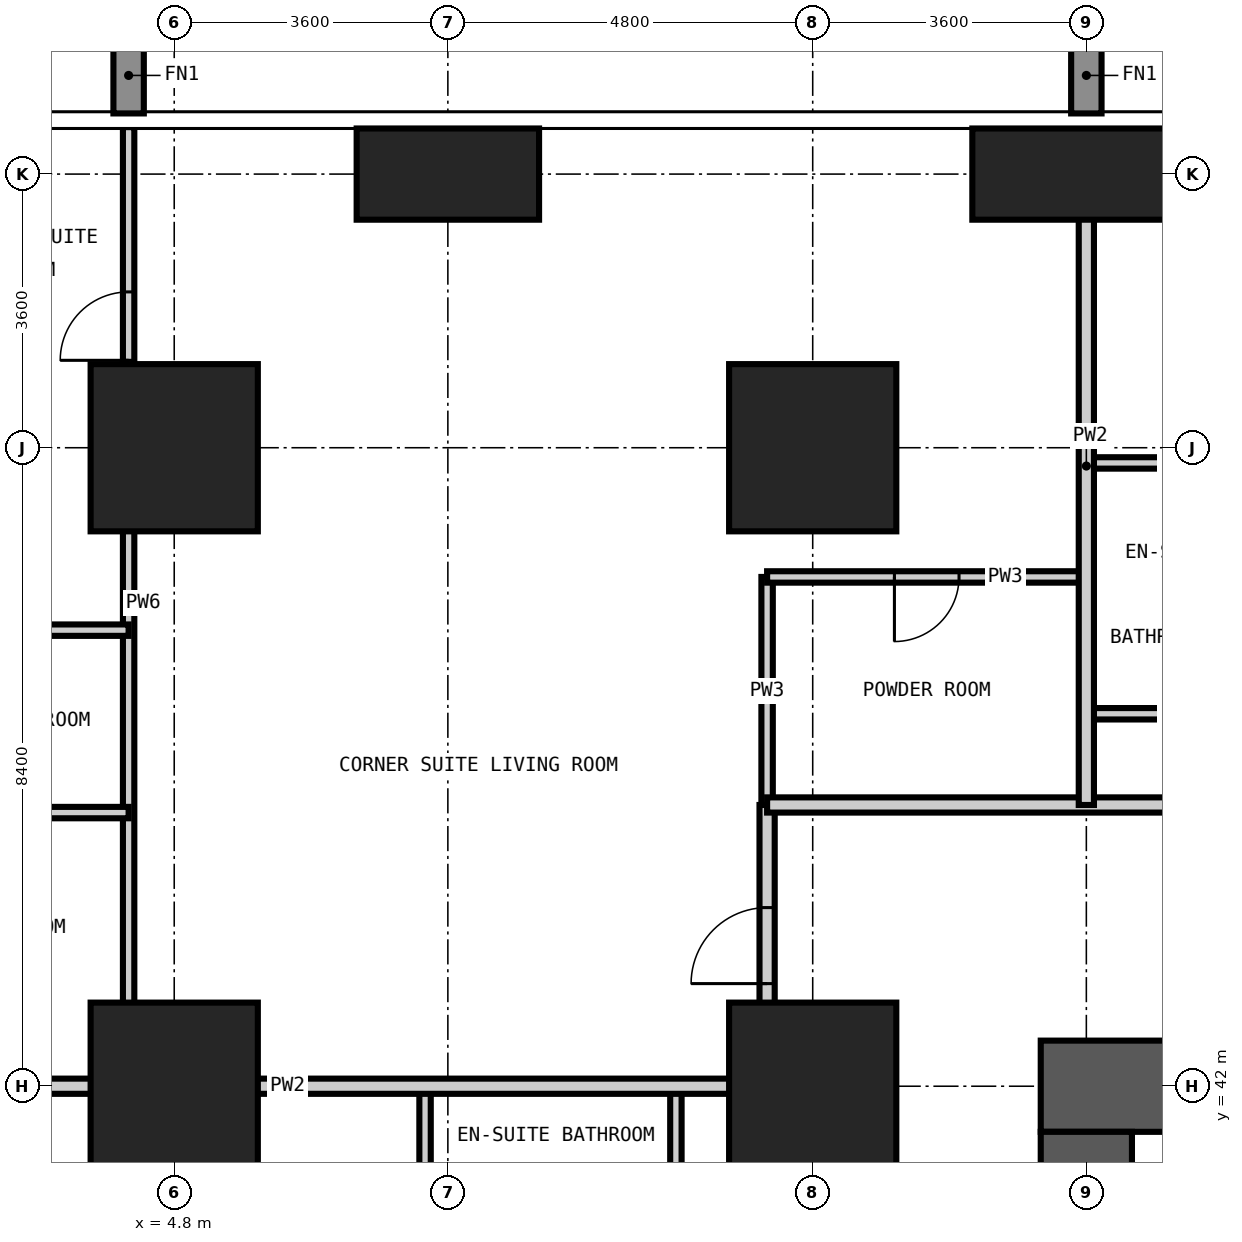
"""IFC4 building model, lengths in metres.
Left out: names, types, materials, properties, quantities, classifications, styles, units other than length and angle.
Written with IfcOpenShell. Run it as: python <this file> out.ifc"""

import sys

from ifc_helpers import new_model, si_unit, direction, frame, frame_2d, origin, origin_2d, place, context, subcontext, project, spatial, rectangle, extrude, element, fill, save


model = new_model("IFC4")
c1 = context("Model", 3, precision=1e-05, world=origin(), true_north=direction((0.0, 1.0)))
c2 = subcontext(c1, "Body", "Model", "MODEL_VIEW")
j1 = project(units=[si_unit("LENGTHUNIT", "METRE"), si_unit("PLANEANGLEUNIT", "RADIAN")], contexts=[c1])
p1 = place(None, origin())
s1 = spatial("IfcSite", under=j1, at=p1, CompositionType="ELEMENT")
p2 = place(p1, origin())
s2 = spatial("IfcBuilding", under=s1, at=p2, CompositionType="ELEMENT")
p3 = place(p2, frame((0.0, 0.0, 97.2)))
s3 = spatial("IfcBuildingStorey", under=s2, at=p3, CompositionType="ELEMENT", Elevation=97.2)
for number, where, z_axis, x_axis in (
    (1, (4.8, 42.0, -0.35), (0.0, 0.0, 1.0), (1.0, 0.0, 0.0)),
    (2, (4.8, 50.4, -0.35), (0.0, 0.0, 1.0), (1.0, 0.0, 0.0)),
):
    element("IfcColumn", number, at=place(p3, frame(where, z_axis=z_axis, x_axis=x_axis)), inside=s3, PredefinedType="COLUMN", context=c2, shape_type="SweptSolid", body=[
        extrude(rectangle(XDim=2.2, YDim=2.2, at=origin_2d()), origin(), (0.0, 0.0, 1.0), 3.6),
    ])
p4 = place(p3, frame((8.4, 54.0, -0.35), z_axis=(0.0, 0.0, 1.0), x_axis=(1.0, 0.0, 0.0)))
e3 = element("IfcColumn", 3, at=p4, inside=s3, PredefinedType="COLUMN", context=c2, shape_type="SweptSolid", body=[
    extrude(rectangle(XDim=2.4, YDim=1.2, at=origin_2d()), origin(), (0.0, 0.0, 1.0), 3.6),
])
for number, where, z_axis, x_axis in (
    (4, (13.2, 42.0, -0.35), (0.0, 0.0, 1.0), (1.0, 0.0, 0.0)),
    (5, (13.2, 50.4, -0.35), (0.0, 0.0, 1.0), (1.0, 0.0, 0.0)),
):
    element("IfcColumn", number, at=place(p3, frame(where, z_axis=z_axis, x_axis=x_axis)), inside=s3, PredefinedType="COLUMN", context=c2, shape_type="SweptSolid", body=[
        extrude(rectangle(XDim=2.2, YDim=2.2, at=origin_2d()), origin(), (0.0, 0.0, 1.0), 3.6),
    ])
p5 = place(p3, frame((16.8, 54.0, -0.35), z_axis=(0.0, 0.0, 1.0), x_axis=(1.0, 0.0, 0.0)))
e6 = element("IfcColumn", 6, at=p5, inside=s3, PredefinedType="COLUMN", context=c2, shape_type="SweptSolid", body=[
    extrude(rectangle(XDim=3.0, YDim=1.2, at=origin_2d()), origin(), (0.0, 0.0, 1.0), 3.6),
])
p6 = place(p3, frame((42.6, 42.0, -0.35), z_axis=(0.0, 0.0, 1.0), x_axis=(-1.0, 0.0, 0.0)))
e7 = element("IfcWall", 7, at=p6, inside=s3, PredefinedType="SHEAR", context=c2, shape_type="SweptSolid", body=[
    extrude(rectangle(XDim=26.4, YDim=1.2, at=frame_2d((13.2, 0.0))), origin(), (0.0, 0.0, 1.0), 3.6),
])
p7 = place(p6, frame((21.1, 0.0, 0.35)))
e8 = element("IfcOpeningElement", 8, at=p7, cuts=e7, PredefinedType="OPENING", context=c2, shape_type="SweptSolid", body=[
    extrude(rectangle(XDim=1.0, YDim=2.1, at=frame_2d((0.5, 1.05))), frame((0.0, 0.61, 0.0), z_axis=(0.0, -1.0, 0.0), x_axis=(1.0, 0.0, 0.0)), (0.0, 0.0, 1.0), 1.22),
])
p8 = place(p6, frame((10.5, 0.0, 0.35)))
e9 = element("IfcOpeningElement", 9, at=p8, cuts=e7, PredefinedType="OPENING", context=c2, shape_type="SweptSolid", body=[
    extrude(rectangle(XDim=1.2, YDim=2.2, at=frame_2d((0.6, 1.1))), frame((0.0, 0.61, 0.0), z_axis=(0.0, -1.0, 0.0), x_axis=(1.0, 0.0, 0.0)), (0.0, 0.0, 1.0), 1.22),
])
p9 = place(p3, frame((16.8, 41.4, -0.35), z_axis=(0.0, 0.0, 1.0), x_axis=(0.0, -1.0, 0.0)))
e10 = element("IfcWall", 10, at=p9, inside=s3, PredefinedType="SHEAR", context=c2, shape_type="SweptSolid", body=[
    extrude(rectangle(XDim=24.0, YDim=1.2, at=frame_2d((12.0, 0.0))), origin(), (0.0, 0.0, 1.0), 3.6),
])
p10 = place(p9, frame((11.1, 0.0, 0.35)))
e11 = element("IfcOpeningElement", 11, at=p10, cuts=e10, PredefinedType="OPENING", context=c2, shape_type="SweptSolid", body=[
    extrude(rectangle(XDim=1.8, YDim=2.2, at=frame_2d((0.9, 1.1))), frame((0.0, 0.61, 0.0), z_axis=(0.0, -1.0, 0.0), x_axis=(1.0, 0.0, 0.0)), (0.0, 0.0, 1.0), 1.22),
])
p11 = place(p9, frame((19.9, 0.0, 0.35)))
e12 = element("IfcOpeningElement", 12, at=p11, cuts=e10, PredefinedType="OPENING", context=c2, shape_type="SweptSolid", body=[
    extrude(rectangle(XDim=1.0, YDim=2.1, at=frame_2d((0.5, 1.05))), frame((0.0, 0.61, 0.0), z_axis=(0.0, -1.0, 0.0), x_axis=(1.0, 0.0, 0.0)), (0.0, 0.0, 1.0), 1.22),
])
p12 = place(p9, frame((5.2, 0.0, 0.35)))
e13 = element("IfcOpeningElement", 13, at=p12, cuts=e10, PredefinedType="OPENING", context=c2, shape_type="SweptSolid", body=[
    extrude(rectangle(XDim=1.0, YDim=2.1, at=frame_2d((0.5, 1.05))), frame((0.0, 0.61, 0.0), z_axis=(0.0, -1.0, 0.0), x_axis=(1.0, 0.0, 0.0)), (0.0, 0.0, 1.0), 1.22),
])
for number, where, z_axis, x_axis in (
    (14, (8.1, 39.6, 0.0), (0.0, 0.0, 1.0), (0.0, 1.0, 0.0)),
    (15, (11.4, 39.6, 0.0), (0.0, 0.0, 1.0), (0.0, 1.0, 0.0)),
):
    element("IfcWall", number, at=place(p3, frame(where, z_axis=z_axis, x_axis=x_axis)), inside=s3, PredefinedType="PARTITIONING", context=c2, shape_type="SweptSolid", body=[
        extrude(rectangle(XDim=2.4, YDim=0.15, at=frame_2d((1.2, 0.0))), origin(), (0.0, 0.0, 1.0), 3.25),
    ])
p13 = place(p3, frame((12.6, 45.7, 0.0), z_axis=(0.0, 0.0, 1.0), x_axis=(0.0, 1.0, 0.0)))
e16 = element("IfcWall", 16, at=p13, inside=s3, PredefinedType="PARTITIONING", context=c2, shape_type="SweptSolid", body=[
    extrude(rectangle(XDim=3.0, YDim=0.15, at=frame_2d((1.5, 0.0))), origin(), (0.0, 0.0, 1.0), 3.25),
])
p14 = place(p3, frame((16.8, 46.9, 0.0), z_axis=(0.0, 0.0, 1.0), x_axis=(1.0, 0.0, 0.0)))
e17 = element("IfcWall", 17, at=p14, inside=s3, PredefinedType="PARTITIONING", context=c2, shape_type="SweptSolid", body=[
    extrude(rectangle(XDim=2.4, YDim=0.15, at=frame_2d((1.2, 0.0))), origin(), (0.0, 0.0, 1.0), 3.25),
])
p15 = place(p3, frame((12.6, 48.7, 0.0), z_axis=(0.0, 0.0, 1.0), x_axis=(1.0, 0.0, 0.0)))
e18 = element("IfcWall", 18, at=p15, inside=s3, PredefinedType="PARTITIONING", context=c2, shape_type="SweptSolid", body=[
    extrude(rectangle(XDim=4.2, YDim=0.15, at=frame_2d((2.1, 0.0))), origin(), (0.0, 0.0, 1.0), 3.25),
])
p16 = place(p15, frame((1.675, 0.0, 0.0)))
e19 = element("IfcOpeningElement", 19, at=p16, cuts=e18, PredefinedType="OPENING", context=c2, shape_type="SweptSolid", body=[
    extrude(rectangle(XDim=0.85, YDim=2.1, at=frame_2d((0.425, 1.05))), frame((0.0, 0.085, 0.0), z_axis=(0.0, -1.0, 0.0), x_axis=(1.0, 0.0, 0.0)), (0.0, 0.0, 1.0), 0.17),
])
p17 = place(p3, frame((16.8, 50.2, 0.0), z_axis=(0.0, 0.0, 1.0), x_axis=(1.0, 0.0, 0.0)))
e20 = element("IfcWall", 20, at=p17, inside=s3, PredefinedType="PARTITIONING", context=c2, shape_type="SweptSolid", body=[
    extrude(rectangle(XDim=2.4, YDim=0.15, at=frame_2d((1.2, 0.0))), origin(), (0.0, 0.0, 1.0), 3.25),
])
p18 = place(p3, frame((12.6, 13.7, 0.0), z_axis=(0.0, 0.0, 1.0), x_axis=(0.0, 1.0, 0.0)))
e21 = element("IfcWall", 21, at=p18, inside=s3, PredefinedType="PARTITIONING", context=c2, shape_type="SweptSolid", body=[
    extrude(rectangle(XDim=32.0, YDim=0.2, at=frame_2d((16.0, 0.0))), origin(), (0.0, 0.0, 1.0), 3.25),
])
p19 = place(p18, frame((5.6, 0.0, 0.0)))
e22 = element("IfcOpeningElement", 22, at=p19, cuts=e21, PredefinedType="OPENING", context=c2, shape_type="SweptSolid", body=[
    extrude(rectangle(XDim=1.0, YDim=2.2, at=frame_2d((0.5, 1.1))), frame((0.0, 0.11, 0.0), z_axis=(0.0, -1.0, 0.0), x_axis=(1.0, 0.0, 0.0)), (0.0, 0.0, 1.0), 0.22),
])
p20 = place(p18, frame((16.4, 0.0, 0.0)))
e23 = element("IfcOpeningElement", 23, at=p20, cuts=e21, PredefinedType="OPENING", context=c2, shape_type="SweptSolid", body=[
    extrude(rectangle(XDim=1.0, YDim=2.2, at=frame_2d((0.5, 1.1))), frame((0.0, 0.11, 0.0), z_axis=(0.0, -1.0, 0.0), x_axis=(1.0, 0.0, 0.0)), (0.0, 0.0, 1.0), 0.22),
])
p21 = place(p18, frame((22.4, 0.0, 0.0)))
e24 = element("IfcOpeningElement", 24, at=p21, cuts=e21, PredefinedType="OPENING", context=c2, shape_type="SweptSolid", body=[
    extrude(rectangle(XDim=1.0, YDim=2.2, at=frame_2d((0.5, 1.1))), frame((0.0, 0.11, 0.0), z_axis=(0.0, -1.0, 0.0), x_axis=(1.0, 0.0, 0.0)), (0.0, 0.0, 1.0), 0.22),
])
p22 = place(p18, frame((0.95, 0.0, 0.0)))
e25 = element("IfcOpeningElement", 25, at=p22, cuts=e21, PredefinedType="OPENING", context=c2, shape_type="SweptSolid", body=[
    extrude(rectangle(XDim=1.0, YDim=2.2, at=frame_2d((0.5, 1.1))), frame((0.0, 0.11, 0.0), z_axis=(0.0, -1.0, 0.0), x_axis=(1.0, 0.0, 0.0)), (0.0, 0.0, 1.0), 0.22),
])
p23 = place(p18, frame((29.65, 0.0, 0.0)))
e26 = element("IfcOpeningElement", 26, at=p23, cuts=e21, PredefinedType="OPENING", context=c2, shape_type="SweptSolid", body=[
    extrude(rectangle(XDim=1.0, YDim=2.2, at=frame_2d((0.5, 1.1))), frame((0.0, 0.11, 0.0), z_axis=(0.0, -1.0, 0.0), x_axis=(1.0, 0.0, 0.0)), (0.0, 0.0, 1.0), 0.22),
])
p24 = place(p3, frame((12.6, 45.7, 0.0), z_axis=(0.0, 0.0, 1.0), x_axis=(1.0, 0.0, 0.0)))
e27 = element("IfcWall", 27, at=p24, inside=s3, PredefinedType="PARTITIONING", context=c2, shape_type="SweptSolid", body=[
    extrude(rectangle(XDim=31.9, YDim=0.2, at=frame_2d((15.95, 0.0))), origin(), (0.0, 0.0, 1.0), 3.25),
])
p25 = place(p24, frame((5.8, 0.0, 0.0)))
e28 = element("IfcOpeningElement", 28, at=p25, cuts=e27, PredefinedType="OPENING", context=c2, shape_type="SweptSolid", body=[
    extrude(rectangle(XDim=1.0, YDim=2.2, at=frame_2d((0.5, 1.1))), frame((0.0, 0.11, 0.0), z_axis=(0.0, -1.0, 0.0), x_axis=(1.0, 0.0, 0.0)), (0.0, 0.0, 1.0), 0.22),
])
p26 = place(p24, frame((12.1, 0.0, 0.0)))
e29 = element("IfcOpeningElement", 29, at=p26, cuts=e27, PredefinedType="OPENING", context=c2, shape_type="SweptSolid", body=[
    extrude(rectangle(XDim=1.0, YDim=2.2, at=frame_2d((0.5, 1.1))), frame((0.0, 0.11, 0.0), z_axis=(0.0, -1.0, 0.0), x_axis=(1.0, 0.0, 0.0)), (0.0, 0.0, 1.0), 0.22),
])
p27 = place(p24, frame((20.5, 0.0, 0.0)))
e30 = element("IfcOpeningElement", 30, at=p27, cuts=e27, PredefinedType="OPENING", context=c2, shape_type="SweptSolid", body=[
    extrude(rectangle(XDim=1.0, YDim=2.2, at=frame_2d((0.5, 1.1))), frame((0.0, 0.11, 0.0), z_axis=(0.0, -1.0, 0.0), x_axis=(1.0, 0.0, 0.0)), (0.0, 0.0, 1.0), 0.22),
])
p28 = place(p24, frame((26.8, 0.0, 0.0)))
e31 = element("IfcOpeningElement", 31, at=p28, cuts=e27, PredefinedType="OPENING", context=c2, shape_type="SweptSolid", body=[
    extrude(rectangle(XDim=1.0, YDim=2.2, at=frame_2d((0.5, 1.1))), frame((0.0, 0.11, 0.0), z_axis=(0.0, -1.0, 0.0), x_axis=(1.0, 0.0, 0.0)), (0.0, 0.0, 1.0), 0.22),
])
p29 = place(p3, frame((16.8, 45.7, 0.0), z_axis=(0.0, 0.0, 1.0), x_axis=(0.0, 1.0, 0.0)))
e32 = element("IfcWall", 32, at=p29, inside=s3, PredefinedType="PARTITIONING", context=c2, shape_type="SweptSolid", body=[
    extrude(rectangle(XDim=8.918, YDim=0.2, at=frame_2d((4.459, 0.0))), origin(), (0.0, 0.0, 1.0), 3.25),
])
p30 = place(p3, frame((-0.018, 42.0, 0.0), z_axis=(0.0, 0.0, 1.0), x_axis=(1.0, 0.0, 0.0)))
e33 = element("IfcWall", 33, at=p30, inside=s3, PredefinedType="PARTITIONING", context=c2, shape_type="SweptSolid", body=[
    extrude(rectangle(XDim=12.618, YDim=0.2, at=frame_2d((6.309, 0.0))), origin(), (0.0, 0.0, 1.0), 3.25),
])
p31 = place(p3, frame((4.2, 42.0, 0.0), z_axis=(0.0, 0.0, 1.0), x_axis=(0.0, 1.0, 0.0)))
e34 = element("IfcWall", 34, at=p31, inside=s3, PredefinedType="PARTITIONING", context=c2, shape_type="SweptSolid", body=[
    extrude(rectangle(XDim=12.618, YDim=0.15, at=frame_2d((6.309, 0.0))), origin(), (0.0, 0.0, 1.0), 3.25),
])
p32 = place(p31, frame((9.55, 0.0, 0.0)))
e35 = element("IfcOpeningElement", 35, at=p32, cuts=e34, PredefinedType="OPENING", context=c2, shape_type="SweptSolid", body=[
    extrude(rectangle(XDim=0.9, YDim=2.1, at=frame_2d((0.45, 1.05))), frame((0.0, 0.085, 0.0), z_axis=(0.0, -1.0, 0.0), x_axis=(1.0, 0.0, 0.0)), (0.0, 0.0, 1.0), 0.17),
])
p33 = place(p3, frame((1.2, 45.6, 0.0), z_axis=(0.0, 0.0, 1.0), x_axis=(1.0, 0.0, 0.0)))
e36 = element("IfcWall", 36, at=p33, inside=s3, PredefinedType="PARTITIONING", context=c2, shape_type="SweptSolid", body=[
    extrude(rectangle(XDim=3.0, YDim=0.15, at=frame_2d((1.5, 0.0))), origin(), (0.0, 0.0, 1.0), 3.25),
])
p34 = place(p3, frame((1.2, 48.0, 0.0), z_axis=(0.0, 0.0, 1.0), x_axis=(1.0, 0.0, 0.0)))
e37 = element("IfcWall", 37, at=p34, inside=s3, PredefinedType="PARTITIONING", context=c2, shape_type="SweptSolid", body=[
    extrude(rectangle(XDim=3.0, YDim=0.15, at=frame_2d((1.5, 0.0))), origin(), (0.0, 0.0, 1.0), 3.25),
])
p35 = place(p34, frame((1.05, 0.0, 0.0)))
e38 = element("IfcOpeningElement", 38, at=p35, cuts=e37, PredefinedType="OPENING", context=c2, shape_type="SweptSolid", body=[
    extrude(rectangle(XDim=0.9, YDim=2.1, at=frame_2d((0.45, 1.05))), frame((0.0, 0.085, 0.0), z_axis=(0.0, -1.0, 0.0), x_axis=(1.0, 0.0, 0.0)), (0.0, 0.0, 1.0), 0.17),
])
p36 = place(p23, origin())
e39 = element("IfcDoor", 39, at=p36, inside=s3, OperationType="SINGLE_SWING_LEFT", PredefinedType="DOOR", context=c2, shape_type="SweptSolid", body=[
    extrude(rectangle(XDim=1.0, YDim=2.2, at=frame_2d((0.5, 1.1))), frame((0.0, 0.025, 0.0), z_axis=(0.0, -1.0, 0.0), x_axis=(1.0, 0.0, 0.0)), (0.0, 0.0, 1.0), 0.05),
])
fill(e26, e39)
p37 = place(p16, frame((0.85, 0.0, 0.0), z_axis=(0.0, 0.0, 1.0), x_axis=(-1.0, 0.0, 0.0)))
e40 = element("IfcDoor", 40, at=p37, inside=s3, OperationType="SINGLE_SWING_RIGHT", PredefinedType="DOOR", context=c2, shape_type="SweptSolid", body=[
    extrude(rectangle(XDim=0.85, YDim=2.1, at=frame_2d((0.425, 1.05))), frame((0.0, 0.025, 0.0), z_axis=(0.0, -1.0, 0.0), x_axis=(1.0, 0.0, 0.0)), (0.0, 0.0, 1.0), 0.05),
])
fill(e19, e40)
p38 = place(p32, origin())
e41 = element("IfcDoor", 41, at=p38, inside=s3, OperationType="SINGLE_SWING_LEFT", PredefinedType="DOOR", context=c2, shape_type="SweptSolid", body=[
    extrude(rectangle(XDim=0.9, YDim=2.1, at=frame_2d((0.45, 1.05))), frame((0.0, 0.025, 0.0), z_axis=(0.0, -1.0, 0.0), x_axis=(1.0, 0.0, 0.0)), (0.0, 0.0, 1.0), 0.05),
])
fill(e35, e41)
save(model, sys.argv[1])
